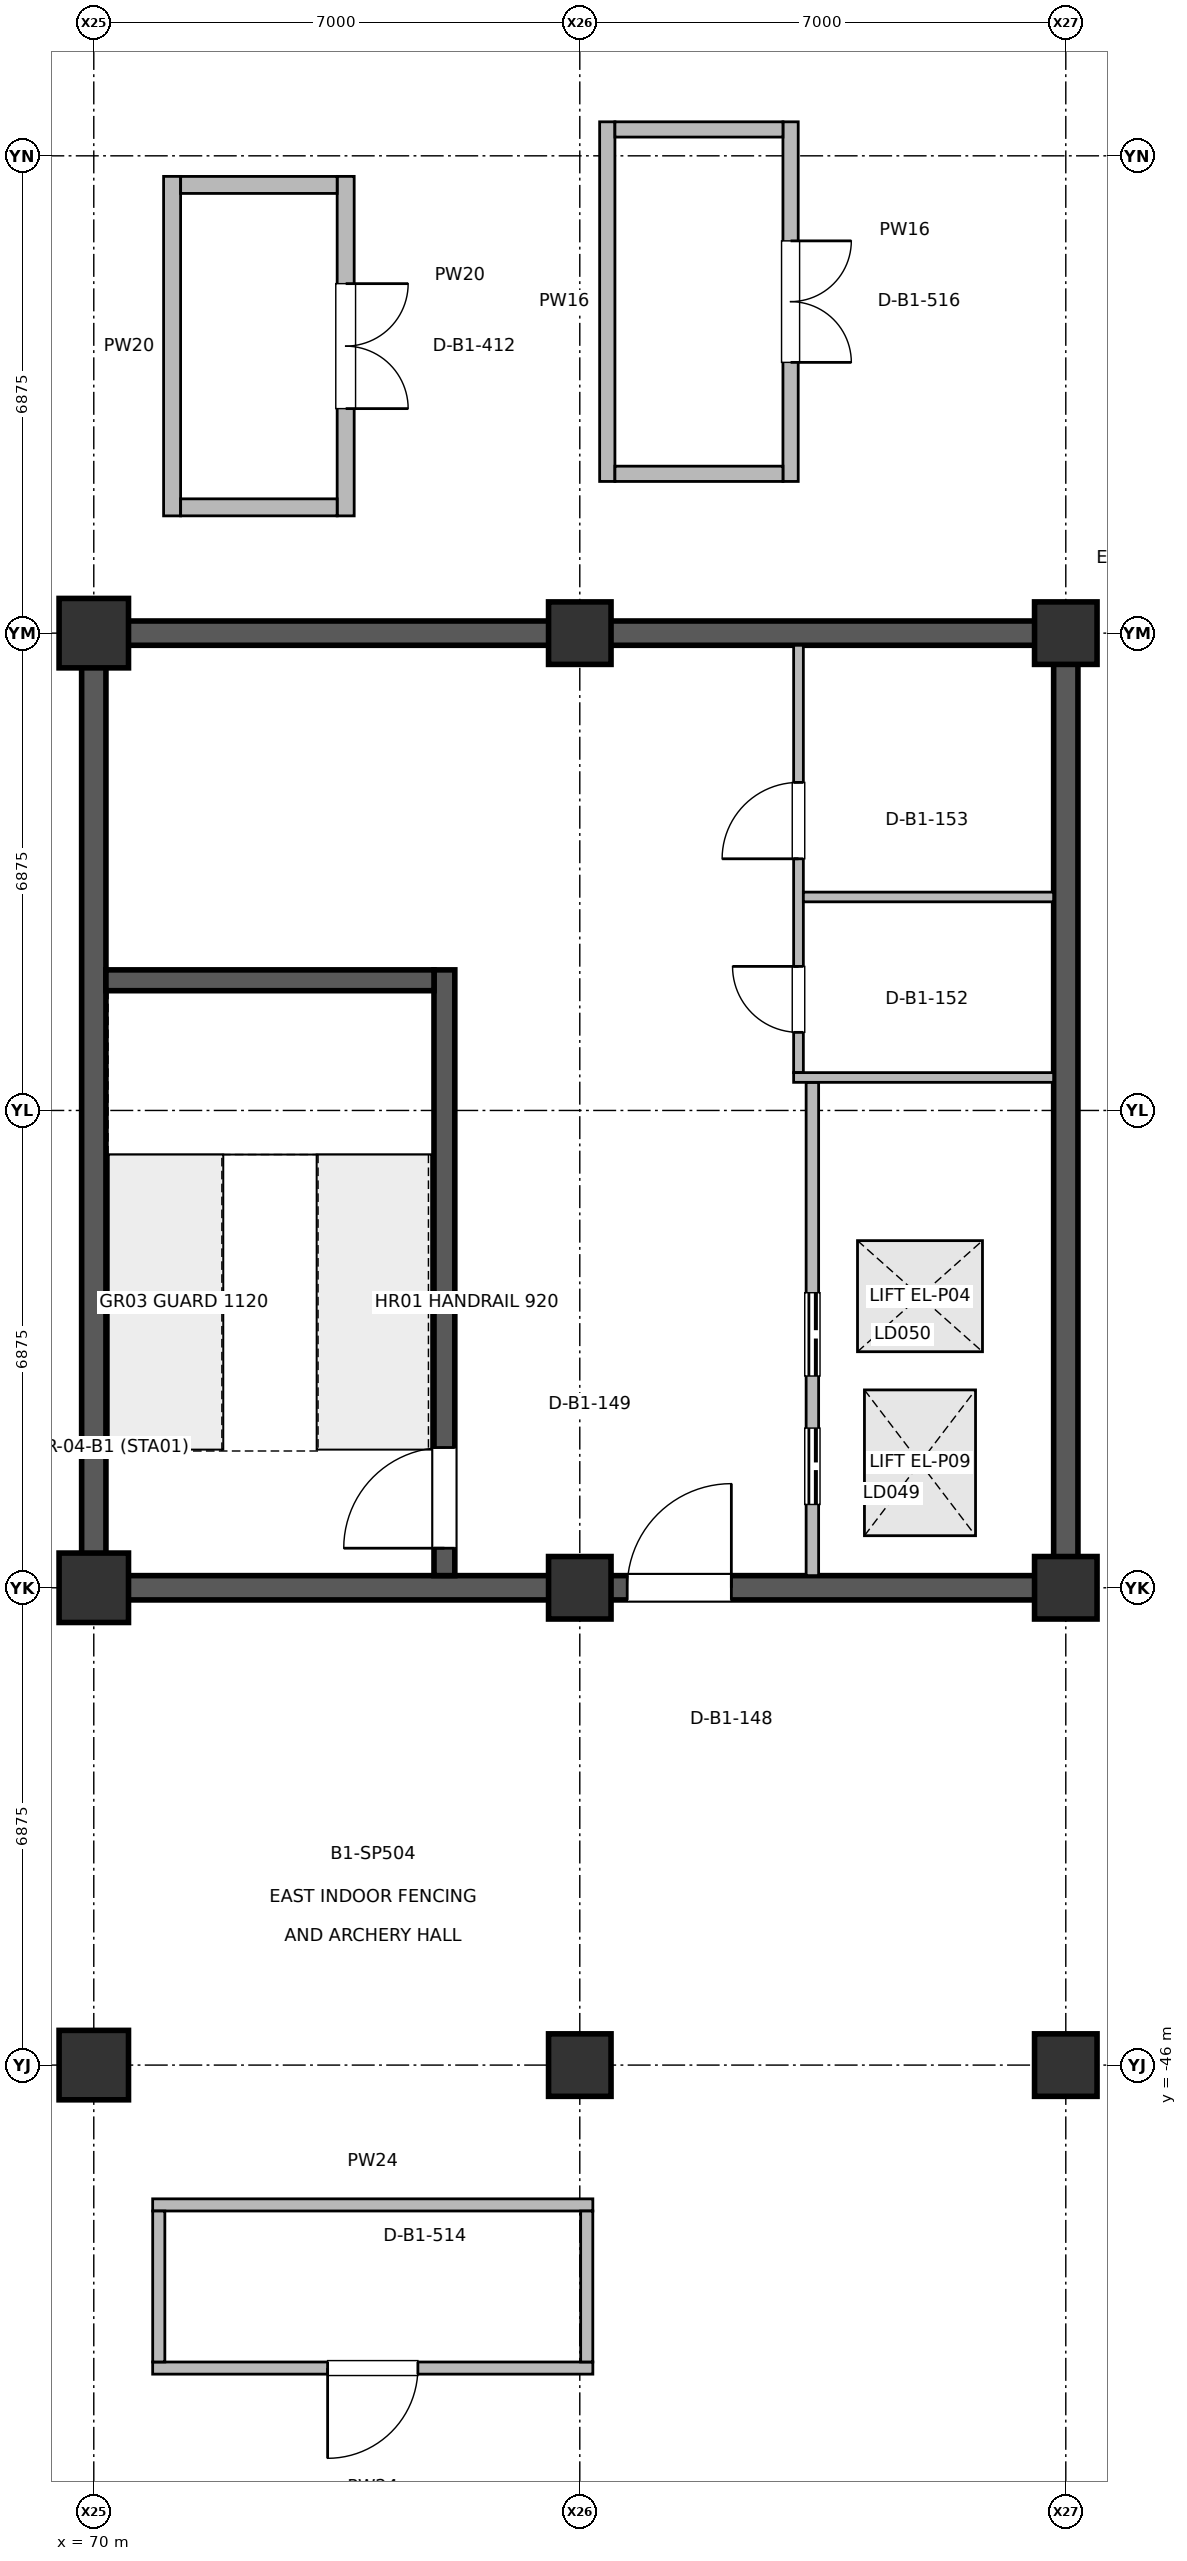
"""IFC4 building model, lengths in metres.
Left out: names, types, materials, properties, quantities, classifications, styles, units other than length and angle.
Written with IfcOpenShell. Run it as: python <this file> out.ifc"""

import sys

from ifc_helpers import new_model, si_unit, direction, frame, frame_2d, origin, origin_2d, place, context, subcontext, project, spatial, rectangle, extrude, element, fill, save


model = new_model("IFC4")
c1 = context("Model", 3, precision=1e-05, world=origin(), true_north=direction((0.0, 1.0)))
c2 = subcontext(c1, "Body", "Model", "MODEL_VIEW")
j1 = project(units=[si_unit("LENGTHUNIT", "METRE"), si_unit("PLANEANGLEUNIT", "RADIAN")], contexts=[c1])
p1 = place(None, origin())
s1 = spatial("IfcSite", under=j1, at=p1, CompositionType="ELEMENT")
p2 = place(p1, origin())
s2 = spatial("IfcBuilding", under=s1, at=p2, CompositionType="ELEMENT")
p3 = place(p2, frame((0.0, 0.0, -6.0)))
s3 = spatial("IfcBuildingStorey", under=s2, at=p3, CompositionType="ELEMENT", Elevation=-6.0)
for number, where, z_axis, x_axis in (
    (1, (70.0, -46.0, 0.0), (0.0, 0.0, 1.0), (1.0, 0.0, 0.0)),
    (2, (70.0, -39.125, 0.0), (0.0, 0.0, 1.0), (1.0, 0.0, 0.0)),
    (3, (70.0, -25.375, 0.0), (0.0, 0.0, 1.0), (1.0, 0.0, 0.0)),
):
    element("IfcColumn", number, at=place(p3, frame(where, z_axis=z_axis, x_axis=x_axis)), inside=s3, PredefinedType="COLUMN", context=c2, shape_type="SweptSolid", body=[
        extrude(rectangle(XDim=1.0, YDim=1.0, at=origin_2d()), origin(), (0.0, 0.0, 1.0), 5.998),
    ])
for number, where, z_axis, x_axis in (
    (4, (77.0, -46.0, 0.0), (0.0, 0.0, 1.0), (1.0, 0.0, 0.0)),
    (5, (77.0, -39.125, 0.0), (0.0, 0.0, 1.0), (1.0, 0.0, 0.0)),
    (6, (77.0, -25.375, 0.0), (0.0, 0.0, 1.0), (1.0, 0.0, 0.0)),
    (7, (84.0, -46.0, 0.0), (0.0, 0.0, 1.0), (1.0, 0.0, 0.0)),
    (8, (84.0, -39.125, 0.0), (0.0, 0.0, 1.0), (1.0, 0.0, 0.0)),
    (9, (84.0, -25.375, 0.0), (0.0, 0.0, 1.0), (1.0, 0.0, 0.0)),
):
    element("IfcColumn", number, at=place(p3, frame(where, z_axis=z_axis, x_axis=x_axis)), inside=s3, PredefinedType="COLUMN", context=c2, shape_type="SweptSolid", body=[
        extrude(rectangle(XDim=0.9, YDim=0.9, at=origin_2d()), origin(), (0.0, 0.0, 1.0), 5.998),
    ])
for number, where, z_axis, x_axis in (
    (10, (70.0, -38.95, 0.0), (0.0, 0.0, 1.0), (0.0, 1.0, 0.0)),
    (11, (84.0, -38.95, 0.0), (0.0, 0.0, 1.0), (0.0, 1.0, 0.0)),
):
    element("IfcWall", number, at=place(p3, frame(where, z_axis=z_axis, x_axis=x_axis)), inside=s3, PredefinedType="SHEAR", context=c2, shape_type="SweptSolid", body=[
        extrude(rectangle(XDim=13.4, YDim=0.35, at=frame_2d((6.7, 0.0))), origin(), (0.0, 0.0, 1.0), 5.72),
    ])
p4 = place(p3, frame((70.175, -39.125, 0.0), z_axis=(0.0, 0.0, 1.0), x_axis=(1.0, 0.0, 0.0)))
e12 = element("IfcWall", 12, at=p4, inside=s3, PredefinedType="SHEAR", context=c2, shape_type="SweptSolid", body=[
    extrude(rectangle(XDim=13.65, YDim=0.35, at=frame_2d((6.825, 0.0))), origin(), (0.0, 0.0, 1.0), 5.72),
])
p5 = place(p4, frame((7.508, 0.0, 0.0)))
e13 = element("IfcOpeningElement", 13, at=p5, cuts=e12, PredefinedType="OPENING", context=c2, shape_type="SweptSolid", body=[
    extrude(rectangle(XDim=1.5, YDim=2.2, at=frame_2d((0.75, 1.1))), frame((0.0, 0.185, 0.0), z_axis=(0.0, -1.0, 0.0), x_axis=(1.0, 0.0, 0.0)), (0.0, 0.0, 1.0), 0.37),
])
p6 = place(p3, frame((70.175, -25.375, 0.0), z_axis=(0.0, 0.0, 1.0), x_axis=(1.0, 0.0, 0.0)))
e14 = element("IfcWall", 14, at=p6, inside=s3, PredefinedType="SHEAR", context=c2, shape_type="SweptSolid", body=[
    extrude(rectangle(XDim=13.65, YDim=0.35, at=frame_2d((6.825, 0.0))), origin(), (0.0, 0.0, 1.0), 5.72),
])
p7 = place(p3, frame((75.05, -38.95, 0.0), z_axis=(0.0, 0.0, 1.0), x_axis=(0.0, 1.0, 0.0)))
e15 = element("IfcWall", 15, at=p7, inside=s3, PredefinedType="SHEAR", context=c2, shape_type="SweptSolid", body=[
    extrude(rectangle(XDim=8.725, YDim=0.3, at=frame_2d((4.362, 0.0))), origin(), (0.0, 0.0, 1.0), 5.72),
])
p8 = place(p7, frame((0.395, 0.0, 0.0)))
e16 = element("IfcOpeningElement", 16, at=p8, cuts=e15, PredefinedType="OPENING", context=c2, shape_type="SweptSolid", body=[
    extrude(rectangle(XDim=1.45, YDim=2.2, at=frame_2d((0.725, 1.1))), frame((0.0, 0.16, 0.0), z_axis=(0.0, -1.0, 0.0), x_axis=(1.0, 0.0, 0.0)), (0.0, 0.0, 1.0), 0.32),
])
p9 = place(p3, frame((80.35, -38.95, 0.0), z_axis=(0.0, 0.0, 1.0), x_axis=(0.0, 1.0, 0.0)))
e17 = element("IfcWall", 17, at=p9, inside=s3, PredefinedType="PARTITIONING", context=c2, shape_type="SweptSolid", body=[
    extrude(rectangle(XDim=7.105, YDim=0.18, at=frame_2d((3.552, 0.0))), origin(), (0.0, 0.0, 1.0), 5.02),
])
p10 = place(p9, frame((1.025, 0.0, 0.0)))
e18 = element("IfcOpeningElement", 18, at=p10, cuts=e17, PredefinedType="OPENING", context=c2, shape_type="SweptSolid", body=[
    extrude(rectangle(XDim=1.1, YDim=2.2, at=frame_2d((0.55, 1.1))), frame((0.0, 0.1, 0.0), z_axis=(0.0, -1.0, 0.0), x_axis=(1.0, 0.0, 0.0)), (0.0, 0.0, 1.0), 0.2),
])
p11 = place(p9, frame((2.875, 0.0, 0.0)))
e19 = element("IfcOpeningElement", 19, at=p11, cuts=e17, PredefinedType="OPENING", context=c2, shape_type="SweptSolid", body=[
    extrude(rectangle(XDim=1.2, YDim=2.25, at=frame_2d((0.6, 1.125))), frame((0.0, 0.1, 0.0), z_axis=(0.0, -1.0, 0.0), x_axis=(1.0, 0.0, 0.0)), (0.0, 0.0, 1.0), 0.2),
])
p12 = place(p3, frame((80.15, -31.705, 0.0), z_axis=(0.0, 0.0, 1.0), x_axis=(0.0, 1.0, 0.0)))
e20 = element("IfcWall", 20, at=p12, inside=s3, PredefinedType="PARTITIONING", context=c2, shape_type="SweptSolid", body=[
    extrude(rectangle(XDim=6.155, YDim=0.14, at=frame_2d((3.078, 0.0))), origin(), (0.0, 0.0, 1.0), 5.02),
])
p13 = place(p12, frame((0.58, 0.0, 0.0)))
e21 = element("IfcOpeningElement", 21, at=p13, cuts=e20, PredefinedType="OPENING", context=c2, shape_type="SweptSolid", body=[
    extrude(rectangle(XDim=0.95, YDim=2.15, at=frame_2d((0.475, 1.075))), frame((0.0, 0.08, 0.0), z_axis=(0.0, -1.0, 0.0), x_axis=(1.0, 0.0, 0.0)), (0.0, 0.0, 1.0), 0.16),
])
p14 = place(p12, frame((3.08, 0.0, 0.0)))
e22 = element("IfcOpeningElement", 22, at=p14, cuts=e20, PredefinedType="OPENING", context=c2, shape_type="SweptSolid", body=[
    extrude(rectangle(XDim=1.1, YDim=2.15, at=frame_2d((0.55, 1.075))), frame((0.0, 0.08, 0.0), z_axis=(0.0, -1.0, 0.0), x_axis=(1.0, 0.0, 0.0)), (0.0, 0.0, 1.0), 0.16),
])
p15 = place(p3, frame((73.628, -18.796, 0.0), z_axis=(0.0, 0.0, 1.0), x_axis=(0.0, -1.0, 0.0)))
e23 = element("IfcWall", 23, at=p15, inside=s3, PredefinedType="PARTITIONING", context=c2, shape_type="SweptSolid", body=[
    extrude(rectangle(XDim=4.89, YDim=0.245, at=frame_2d((2.445, 0.0))), origin(), (0.0, 0.0, 1.0), 5.02),
])
p16 = place(p15, frame((1.545, 0.0, 0.0)))
e24 = element("IfcOpeningElement", 24, at=p16, cuts=e23, PredefinedType="OPENING", context=c2, shape_type="SweptSolid", body=[
    extrude(rectangle(XDim=1.8, YDim=2.3, at=frame_2d((0.9, 1.15))), frame((0.0, 0.133, 0.0), z_axis=(0.0, -1.0, 0.0), x_axis=(1.0, 0.0, 0.0)), (0.0, 0.0, 1.0), 0.265),
])
p17 = place(p3, frame((77.188, -50.364, 0.0), z_axis=(0.0, 0.0, 1.0), x_axis=(-1.0, 0.0, 0.0)))
e25 = element("IfcWall", 25, at=p17, inside=s3, PredefinedType="PARTITIONING", context=c2, shape_type="SweptSolid", body=[
    extrude(rectangle(XDim=6.34, YDim=0.175, at=frame_2d((3.17, 0.0))), origin(), (0.0, 0.0, 1.0), 5.02),
])
p18 = place(p17, frame((2.52, 0.0, 0.0)))
e26 = element("IfcOpeningElement", 26, at=p18, cuts=e25, PredefinedType="OPENING", context=c2, shape_type="SweptSolid", body=[
    extrude(rectangle(XDim=1.3, YDim=2.3, at=frame_2d((0.65, 1.15))), frame((0.0, 0.097, 0.0), z_axis=(0.0, -1.0, 0.0), x_axis=(1.0, 0.0, 0.0)), (0.0, 0.0, 1.0), 0.195),
])
p19 = place(p3, frame((80.036, -18.01, 0.0), z_axis=(0.0, 0.0, 1.0), x_axis=(0.0, -1.0, 0.0)))
e27 = element("IfcWall", 27, at=p19, inside=s3, PredefinedType="PARTITIONING", context=c2, shape_type="SweptSolid", body=[
    extrude(rectangle(XDim=5.18, YDim=0.22, at=frame_2d((2.59, 0.0))), origin(), (0.0, 0.0, 1.0), 5.02),
])
p20 = place(p19, frame((1.715, 0.0, 0.0)))
e28 = element("IfcOpeningElement", 28, at=p20, cuts=e27, PredefinedType="OPENING", context=c2, shape_type="SweptSolid", body=[
    extrude(rectangle(XDim=1.75, YDim=2.35, at=frame_2d((0.875, 1.175))), frame((0.0, 0.12, 0.0), z_axis=(0.0, -1.0, 0.0), x_axis=(1.0, 0.0, 0.0)), (0.0, 0.0, 1.0), 0.24),
])
p21 = place(p3, frame((80.08, -31.775, 0.0), z_axis=(0.0, 0.0, 1.0), x_axis=(1.0, 0.0, 0.0)))
e29 = element("IfcWall", 29, at=p21, inside=s3, PredefinedType="PARTITIONING", context=c2, shape_type="SweptSolid", body=[
    extrude(rectangle(XDim=3.745, YDim=0.14, at=frame_2d((1.873, 0.0))), origin(), (0.0, 0.0, 1.0), 5.02),
])
p22 = place(p3, frame((80.22, -29.175, 0.0), z_axis=(0.0, 0.0, 1.0), x_axis=(1.0, 0.0, 0.0)))
e30 = element("IfcWall", 30, at=p22, inside=s3, PredefinedType="PARTITIONING", context=c2, shape_type="SweptSolid", body=[
    extrude(rectangle(XDim=3.605, YDim=0.14, at=frame_2d((1.802, 0.0))), origin(), (0.0, 0.0, 1.0), 5.02),
])
p23 = place(p3, frame((71.128, -23.686, 0.0), z_axis=(0.0, 0.0, 1.0), x_axis=(0.0, 1.0, 0.0)))
e31 = element("IfcWall", 31, at=p23, inside=s3, PredefinedType="PARTITIONING", context=c2, shape_type="SweptSolid", body=[
    extrude(rectangle(XDim=4.89, YDim=0.245, at=frame_2d((2.445, 0.0))), origin(), (0.0, 0.0, 1.0), 5.02),
])
for number, where, z_axis, x_axis in (
    (32, (71.251, -23.563, 0.0), (0.0, 0.0, 1.0), (1.0, 0.0, 0.0)),
    (33, (71.251, -18.919, 0.0), (0.0, 0.0, 1.0), (1.0, 0.0, 0.0)),
):
    element("IfcWall", number, at=place(p3, frame(where, z_axis=z_axis, x_axis=x_axis)), inside=s3, PredefinedType="PARTITIONING", context=c2, shape_type="SweptSolid", body=[
        extrude(rectangle(XDim=2.254, YDim=0.245, at=frame_2d((1.127, 0.0))), origin(), (0.0, 0.0, 1.0), 5.02),
    ])
p24 = place(p3, frame((70.848, -48.014, 0.0), z_axis=(0.0, 0.0, 1.0), x_axis=(1.0, 0.0, 0.0)))
e34 = element("IfcWall", 34, at=p24, inside=s3, PredefinedType="PARTITIONING", context=c2, shape_type="SweptSolid", body=[
    extrude(rectangle(XDim=6.34, YDim=0.175, at=frame_2d((3.17, 0.0))), origin(), (0.0, 0.0, 1.0), 5.02),
])
for number, where, z_axis, x_axis in (
    (35, (70.936, -50.276, 0.0), (0.0, 0.0, 1.0), (0.0, 1.0, 0.0)),
    (36, (77.1, -50.276, 0.0), (0.0, 0.0, 1.0), (0.0, 1.0, 0.0)),
):
    element("IfcWall", number, at=place(p3, frame(where, z_axis=z_axis, x_axis=x_axis)), inside=s3, PredefinedType="PARTITIONING", context=c2, shape_type="SweptSolid", body=[
        extrude(rectangle(XDim=2.174, YDim=0.175, at=frame_2d((1.087, 0.0))), origin(), (0.0, 0.0, 1.0), 5.02),
    ])
p25 = place(p3, frame((77.396, -23.19, 0.0), z_axis=(0.0, 0.0, 1.0), x_axis=(0.0, 1.0, 0.0)))
e37 = element("IfcWall", 37, at=p25, inside=s3, PredefinedType="PARTITIONING", context=c2, shape_type="SweptSolid", body=[
    extrude(rectangle(XDim=5.18, YDim=0.22, at=frame_2d((2.59, 0.0))), origin(), (0.0, 0.0, 1.0), 5.02),
])
for number, where, z_axis, x_axis in (
    (38, (77.506, -23.08, 0.0), (0.0, 0.0, 1.0), (1.0, 0.0, 0.0)),
    (39, (77.506, -18.12, 0.0), (0.0, 0.0, 1.0), (1.0, 0.0, 0.0)),
):
    element("IfcWall", number, at=place(p3, frame(where, z_axis=z_axis, x_axis=x_axis)), inside=s3, PredefinedType="PARTITIONING", context=c2, shape_type="SweptSolid", body=[
        extrude(rectangle(XDim=2.42, YDim=0.22, at=frame_2d((1.21, 0.0))), origin(), (0.0, 0.0, 1.0), 5.02),
    ])
p26 = place(p3, frame((70.175, -30.375, 0.0), z_axis=(0.0, 0.0, 1.0), x_axis=(1.0, 0.0, 0.0)))
e40 = element("IfcWall", 40, at=p26, inside=s3, PredefinedType="SHEAR", context=c2, shape_type="SweptSolid", body=[
    extrude(rectangle(XDim=4.725, YDim=0.3, at=frame_2d((2.362, 0.0))), origin(), (0.0, 0.0, 1.0), 5.72),
])
p27 = place(p5, origin())
e41 = element("IfcDoor", 41, at=p27, inside=s3, OperationType="SINGLE_SWING_RIGHT", PredefinedType="DOOR", context=c2, shape_type="SweptSolid", body=[
    extrude(rectangle(XDim=1.5, YDim=2.2, at=frame_2d((0.75, 1.1))), frame((0.0, 0.025, 0.0), z_axis=(0.0, -1.0, 0.0), x_axis=(1.0, 0.0, 0.0)), (0.0, 0.0, 1.0), 0.05),
])
fill(e13, e41)
p28 = place(p8, origin())
e42 = element("IfcDoor", 42, at=p28, inside=s3, OperationType="SINGLE_SWING_LEFT", PredefinedType="DOOR", context=c2, shape_type="SweptSolid", body=[
    extrude(rectangle(XDim=1.45, YDim=2.2, at=frame_2d((0.725, 1.1))), frame((0.0, 0.025, 0.0), z_axis=(0.0, -1.0, 0.0), x_axis=(1.0, 0.0, 0.0)), (0.0, 0.0, 1.0), 0.05),
])
fill(e16, e42)
p29 = place(p10, origin())
e43 = element("IfcDoor", 43, at=p29, inside=s3, OperationType="DOUBLE_DOOR_SLIDING", PredefinedType="DOOR", context=c2, shape_type="SweptSolid", body=[
    extrude(rectangle(XDim=1.1, YDim=2.2, at=frame_2d((0.55, 1.1))), frame((0.0, 0.025, 0.0), z_axis=(0.0, -1.0, 0.0), x_axis=(1.0, 0.0, 0.0)), (0.0, 0.0, 1.0), 0.05),
])
fill(e18, e43)
p30 = place(p11, origin())
e44 = element("IfcDoor", 44, at=p30, inside=s3, OperationType="DOUBLE_DOOR_SLIDING", PredefinedType="DOOR", context=c2, shape_type="SweptSolid", body=[
    extrude(rectangle(XDim=1.2, YDim=2.25, at=frame_2d((0.6, 1.125))), frame((0.0, 0.025, 0.0), z_axis=(0.0, -1.0, 0.0), x_axis=(1.0, 0.0, 0.0)), (0.0, 0.0, 1.0), 0.05),
])
fill(e19, e44)
p31 = place(p13, origin())
e45 = element("IfcDoor", 45, at=p31, inside=s3, OperationType="SINGLE_SWING_RIGHT", PredefinedType="DOOR", context=c2, shape_type="SweptSolid", body=[
    extrude(rectangle(XDim=0.95, YDim=2.15, at=frame_2d((0.475, 1.075))), frame((0.0, 0.025, 0.0), z_axis=(0.0, -1.0, 0.0), x_axis=(1.0, 0.0, 0.0)), (0.0, 0.0, 1.0), 0.05),
])
fill(e21, e45)
p32 = place(p14, origin())
e46 = element("IfcDoor", 46, at=p32, inside=s3, OperationType="SINGLE_SWING_LEFT", PredefinedType="DOOR", context=c2, shape_type="SweptSolid", body=[
    extrude(rectangle(XDim=1.1, YDim=2.15, at=frame_2d((0.55, 1.075))), frame((0.0, 0.025, 0.0), z_axis=(0.0, -1.0, 0.0), x_axis=(1.0, 0.0, 0.0)), (0.0, 0.0, 1.0), 0.05),
])
fill(e22, e46)
p33 = place(p16, origin())
e47 = element("IfcDoor", 47, at=p33, inside=s3, OperationType="DOUBLE_DOOR_SINGLE_SWING", PredefinedType="DOOR", context=c2, shape_type="SweptSolid", body=[
    extrude(rectangle(XDim=1.8, YDim=2.3, at=frame_2d((0.9, 1.15))), frame((0.0, 0.025, 0.0), z_axis=(0.0, -1.0, 0.0), x_axis=(1.0, 0.0, 0.0)), (0.0, 0.0, 1.0), 0.05),
])
fill(e24, e47)
p34 = place(p18, origin())
e48 = element("IfcDoor", 48, at=p34, inside=s3, OperationType="SINGLE_SWING_RIGHT", PredefinedType="DOOR", context=c2, shape_type="SweptSolid", body=[
    extrude(rectangle(XDim=1.3, YDim=2.3, at=frame_2d((0.65, 1.15))), frame((0.0, 0.025, 0.0), z_axis=(0.0, -1.0, 0.0), x_axis=(1.0, 0.0, 0.0)), (0.0, 0.0, 1.0), 0.05),
])
fill(e26, e48)
p35 = place(p20, origin())
e49 = element("IfcDoor", 49, at=p35, inside=s3, OperationType="DOUBLE_DOOR_SINGLE_SWING", PredefinedType="DOOR", context=c2, shape_type="SweptSolid", body=[
    extrude(rectangle(XDim=1.75, YDim=2.35, at=frame_2d((0.875, 1.175))), frame((0.0, 0.025, 0.0), z_axis=(0.0, -1.0, 0.0), x_axis=(1.0, 0.0, 0.0)), (0.0, 0.0, 1.0), 0.05),
])
fill(e28, e49)
save(model, sys.argv[1])
